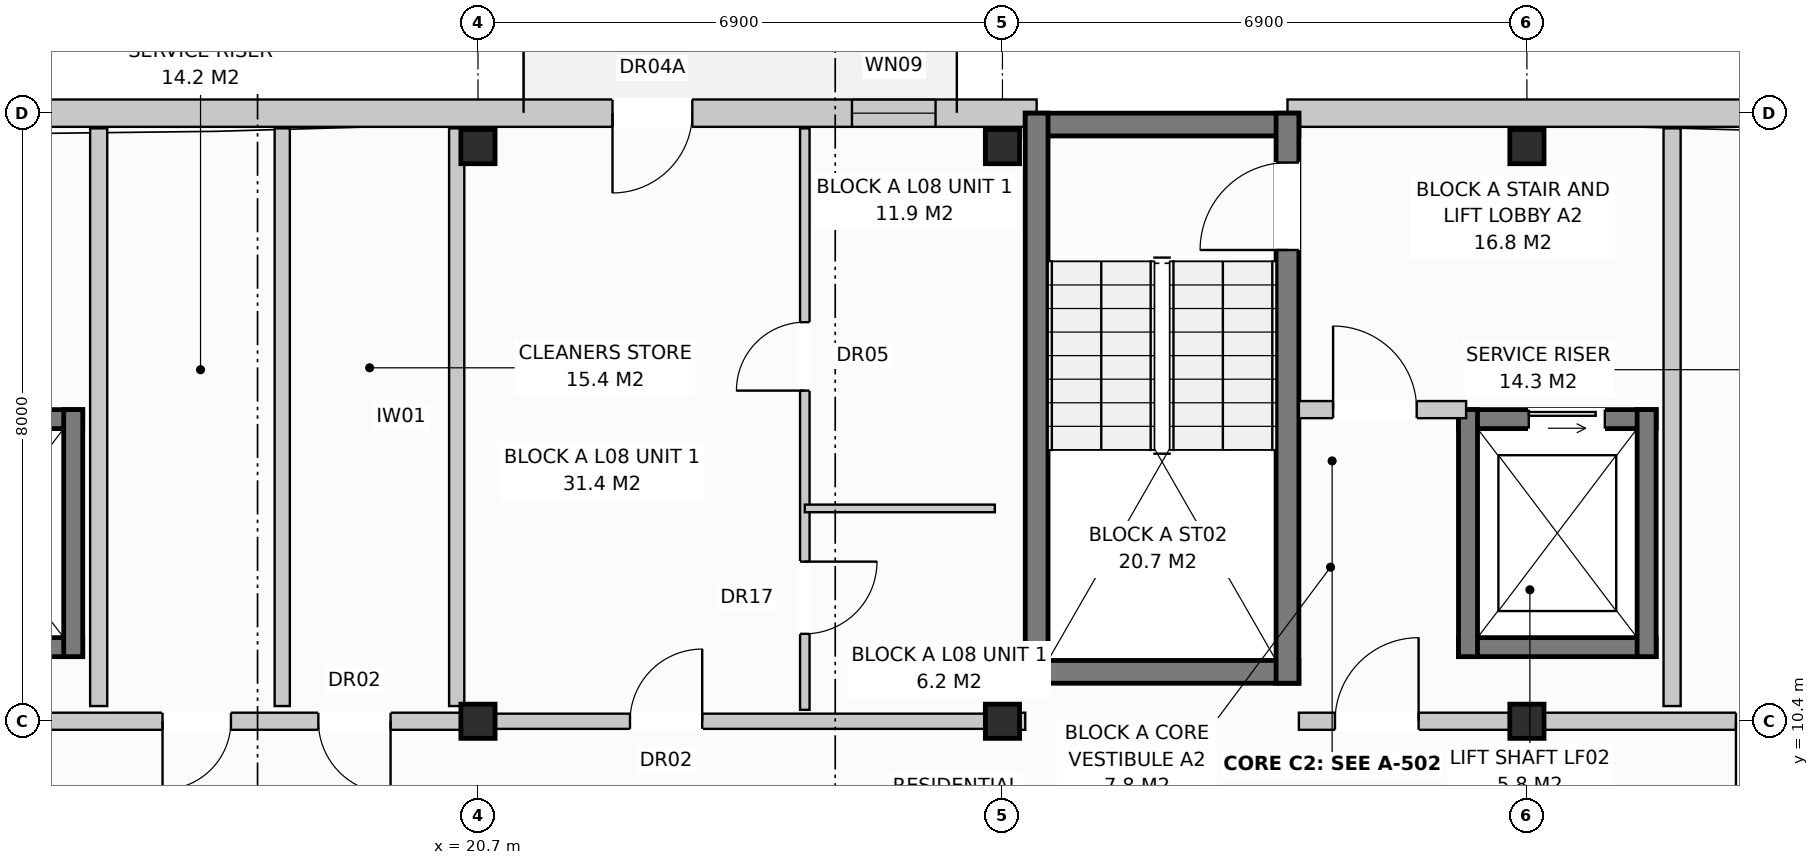
"""IFC4 building model, lengths in metres.
Left out: names, types, materials, properties, quantities, classifications, styles, units other than length and angle.
Written with IfcOpenShell. Run it as: python <this file> out.ifc"""

import sys

from ifc_helpers import new_model, si_unit, direction, frame, frame_2d, origin, origin_with_axes, origin_2d, place, context, subcontext, project, spatial, rectangle, extrude, element, fill, save


model = new_model("IFC4")
c1 = context("Model", 3, precision=1e-05, world=origin(), true_north=direction((0.0, 1.0)))
c2 = subcontext(c1, "Body", "Model", "MODEL_VIEW")
j1 = project(units=[si_unit("LENGTHUNIT", "METRE"), si_unit("PLANEANGLEUNIT", "RADIAN")], contexts=[c1])
p1 = place(None, origin())
s1 = spatial("IfcSite", under=j1, at=p1, CompositionType="ELEMENT")
p2 = place(p1, origin())
s2 = spatial("IfcBuilding", under=s1, at=p2, CompositionType="ELEMENT")
p3 = place(p2, frame((0.0, 0.0, 27.2)))
s3 = spatial("IfcBuildingStorey", under=s2, at=p3, CompositionType="ELEMENT", Elevation=27.2)
for number, where, z_axis, x_axis in (
    (1, (20.7, 10.4, 0.0), (0.0, 0.0, 1.0), (1.0, 0.0, 0.0)),
    (2, (20.7, 17.96, 0.0), (0.0, 0.0, 1.0), (1.0, 0.0, 0.0)),
    (3, (27.6, 10.4, 0.0), (0.0, 0.0, 1.0), (1.0, 0.0, 0.0)),
    (4, (27.6, 17.96, 0.0), (0.0, 0.0, 1.0), (1.0, 0.0, 0.0)),
    (5, (34.5, 10.4, 0.0), (0.0, 0.0, 1.0), (1.0, 0.0, 0.0)),
    (6, (34.5, 17.96, 0.0), (0.0, 0.0, 1.0), (1.0, 0.0, 0.0)),
):
    element("IfcColumn", number, at=place(p3, frame(where, z_axis=z_axis, x_axis=x_axis)), inside=s3, PredefinedType="COLUMN", context=c2, shape_type="SweptSolid", body=[
        extrude(rectangle(XDim=0.45, YDim=0.45, at=origin_2d()), origin(), (0.0, 0.0, 1.0), 3.2),
    ])
p4 = place(p3, frame((10.65, 18.4, 0.0), z_axis=(0.0, 0.0, 1.0), x_axis=(1.0, 0.0, 0.0)))
e7 = element("IfcWall", 7, at=p4, inside=s3, PredefinedType="STANDARD", context=c2, shape_type="SweptSolid", body=[
    extrude(rectangle(XDim=17.4, YDim=0.36, at=frame_2d((8.7, 0.0))), origin(), (0.0, 0.0, 1.0), 2.96),
])
p5 = place(p4, frame((11.82, 0.0, 0.0)))
e8 = element("IfcOpeningElement", 8, at=p5, cuts=e7, PredefinedType="OPENING", context=c2, shape_type="SweptSolid", body=[
    extrude(rectangle(XDim=1.05, YDim=2.12, at=frame_2d((0.525, 1.06))), frame((0.0, 0.192, 0.0), z_axis=(0.0, -1.0, 0.0), x_axis=(1.0, 0.0, 0.0)), (0.0, 0.0, 1.0), 0.384),
])
p6 = place(p4, frame((14.97, 0.0, 0.72)))
e9 = element("IfcOpeningElement", 9, at=p6, cuts=e7, PredefinedType="OPENING", context=c2, shape_type="SweptSolid", body=[
    extrude(rectangle(XDim=1.1, YDim=1.5, at=frame_2d((0.55, 0.75))), frame((0.0, 0.192, 0.0), z_axis=(0.0, -1.0, 0.0), x_axis=(1.0, 0.0, 0.0)), (0.0, 0.0, 1.0), 0.384),
])
p7 = place(p3, frame((31.35, 18.4, 0.0), z_axis=(0.0, 0.0, 1.0), x_axis=(1.0, 0.0, 0.0)))
e10 = element("IfcWall", 10, at=p7, inside=s3, PredefinedType="STANDARD", context=c2, shape_type="SweptSolid", body=[
    extrude(rectangle(XDim=23.68, YDim=0.36, at=frame_2d((11.84, 0.0))), origin(), (0.0, 0.0, 1.0), 2.96),
])
p8 = place(p7, frame((15.269, 0.0, 0.0)))
e11 = element("IfcOpeningElement", 11, at=p8, cuts=e10, PredefinedType="OPENING", context=c2, shape_type="SweptSolid", body=[
    extrude(rectangle(XDim=1.05, YDim=2.12, at=frame_2d((0.525, 1.06))), frame((0.0, 0.192, 0.0), z_axis=(0.0, -1.0, 0.0), x_axis=(1.0, 0.0, 0.0)), (0.0, 0.0, 1.0), 0.384),
])
p9 = place(p7, frame((11.27, 0.0, 0.8)))
e12 = element("IfcOpeningElement", 12, at=p9, cuts=e10, PredefinedType="OPENING", context=c2, shape_type="SweptSolid", body=[
    extrude(rectangle(XDim=1.9, YDim=1.85, at=frame_2d((0.95, 0.925))), frame((0.0, 0.192, 0.0), z_axis=(0.0, -1.0, 0.0), x_axis=(1.0, 0.0, 0.0)), (0.0, 0.0, 1.0), 0.384),
])
p10 = place(p7, frame((20.32, 0.0, 0.8)))
e13 = element("IfcOpeningElement", 13, at=p10, cuts=e10, PredefinedType="OPENING", context=c2, shape_type="SweptSolid", body=[
    extrude(rectangle(XDim=1.8, YDim=1.7, at=frame_2d((0.9, 0.85))), frame((0.0, 0.192, 0.0), z_axis=(0.0, -1.0, 0.0), x_axis=(1.0, 0.0, 0.0)), (0.0, 0.0, 1.0), 0.384),
])
p11 = place(p3, frame((12.9, 14.375, 0.0), z_axis=(0.0, 0.0, 1.0), x_axis=(1.0, 0.0, 0.0)))
e14 = element("IfcWall", 14, at=p11, inside=s3, PredefinedType="SHEAR", context=c2, shape_type="SweptSolid", body=[
    extrude(rectangle(XDim=2.6, YDim=0.25, at=frame_2d((1.3, 0.0))), origin(), (0.0, 0.0, 1.0), 2.96),
])
p12 = place(p11, frame((0.875, 0.0, 0.0)))
e15 = element("IfcOpeningElement", 15, at=p12, cuts=e14, PredefinedType="OPENING", context=c2, shape_type="SweptSolid", body=[
    extrude(rectangle(XDim=1.1, YDim=2.1, at=frame_2d((0.55, 1.05))), frame((0.0, 0.137, 0.0), z_axis=(0.0, -1.0, 0.0), x_axis=(1.0, 0.0, 0.0)), (0.0, 0.0, 1.0), 0.274),
])
p13 = place(p3, frame((12.9, 11.375, 0.0), z_axis=(0.0, 0.0, 1.0), x_axis=(1.0, 0.0, 0.0)))
e16 = element("IfcWall", 16, at=p13, inside=s3, PredefinedType="SHEAR", context=c2, shape_type="SweptSolid", body=[
    extrude(rectangle(XDim=2.6, YDim=0.25, at=frame_2d((1.3, 0.0))), origin(), (0.0, 0.0, 1.0), 2.96),
])
p14 = place(p3, frame((15.375, 11.25, 0.0), z_axis=(0.0, 0.0, 1.0), x_axis=(0.0, 1.0, 0.0)))
e17 = element("IfcWall", 17, at=p14, inside=s3, PredefinedType="SHEAR", context=c2, shape_type="SweptSolid", body=[
    extrude(rectangle(XDim=3.25, YDim=0.25, at=frame_2d((1.625, 0.0))), origin(), (0.0, 0.0, 1.0), 2.96),
])
p15 = place(p3, frame((15.71, 10.6, 0.0), z_axis=(0.0, 0.0, 1.0), x_axis=(0.0, 1.0, 0.0)))
e18 = element("IfcWall", 18, at=p15, inside=s3, PredefinedType="PARTITIONING", context=c2, shape_type="SweptSolid", body=[
    extrude(rectangle(XDim=7.6, YDim=0.225, at=frame_2d((3.8, 0.0))), origin(), (0.0, 0.0, 1.0), 2.59),
])
for number, where, z_axis, x_axis in (
    (19, (18.125, 10.6, 0.0), (0.0, 0.0, 1.0), (0.0, 1.0, 0.0)),
    (20, (20.42, 10.6, 0.0), (0.0, 0.0, 1.0), (0.0, 1.0, 0.0)),
):
    element("IfcWall", number, at=place(p3, frame(where, z_axis=z_axis, x_axis=x_axis)), inside=s3, PredefinedType="PARTITIONING", context=c2, shape_type="SweptSolid", body=[
        extrude(rectangle(XDim=7.6, YDim=0.2, at=frame_2d((3.8, 0.0))), origin(), (0.0, 0.0, 1.0), 2.96),
    ])
p16 = place(p3, frame((10.8, 10.4, 0.0), z_axis=(0.0, 0.0, 1.0), x_axis=(1.0, 0.0, 0.0)))
e21 = element("IfcWall", 21, at=p16, inside=s3, PredefinedType="PARTITIONING", context=c2, shape_type="SweptSolid", body=[
    extrude(rectangle(XDim=9.9, YDim=0.225, at=frame_2d((4.95, 0.0))), origin(), (0.0, 0.0, 1.0), 2.4),
])
p17 = place(p16, frame((0.475, 0.0, 0.0)))
e22 = element("IfcOpeningElement", 22, at=p17, cuts=e21, PredefinedType="OPENING", context=c2, shape_type="SweptSolid", body=[
    extrude(rectangle(XDim=1.1, YDim=2.15, at=frame_2d((0.55, 1.075))), frame((0.0, 0.125, 0.0), z_axis=(0.0, -1.0, 0.0), x_axis=(1.0, 0.0, 0.0)), (0.0, 0.0, 1.0), 0.249),
])
p18 = place(p16, frame((5.75, 0.0, 0.0)))
e23 = element("IfcOpeningElement", 23, at=p18, cuts=e21, PredefinedType="OPENING", context=c2, shape_type="SweptSolid", body=[
    extrude(rectangle(XDim=0.9, YDim=2.1, at=frame_2d((0.45, 1.05))), frame((0.0, 0.125, 0.0), z_axis=(0.0, -1.0, 0.0), x_axis=(1.0, 0.0, 0.0)), (0.0, 0.0, 1.0), 0.249),
])
p19 = place(p16, frame((7.8, 0.0, 0.0)))
e24 = element("IfcOpeningElement", 24, at=p19, cuts=e21, PredefinedType="OPENING", context=c2, shape_type="SweptSolid", body=[
    extrude(rectangle(XDim=0.95, YDim=2.15, at=frame_2d((0.475, 1.075))), frame((0.0, 0.125, 0.0), z_axis=(0.0, -1.0, 0.0), x_axis=(1.0, 0.0, 0.0)), (0.0, 0.0, 1.0), 0.249),
])
for number, where, z_axis, x_axis in (
    (25, (27.9, 18.25, 0.0), (0.0, 0.0, 1.0), (1.0, 0.0, 0.0)),
    (26, (27.9, 11.05, 0.0), (0.0, 0.0, 1.0), (1.0, 0.0, 0.0)),
):
    element("IfcWall", number, at=place(p3, frame(where, z_axis=z_axis, x_axis=x_axis)), inside=s3, PredefinedType="SHEAR", context=c2, shape_type="SweptSolid", body=[
        extrude(rectangle(XDim=3.6, YDim=0.3, at=frame_2d((1.8, 0.0))), origin(), (0.0, 0.0, 1.0), 2.96),
    ])
p20 = place(p3, frame((28.05, 10.9, 0.0), z_axis=(0.0, 0.0, 1.0), x_axis=(0.0, 1.0, 0.0)))
e27 = element("IfcWall", 27, at=p20, inside=s3, PredefinedType="SHEAR", context=c2, shape_type="SweptSolid", body=[
    extrude(rectangle(XDim=7.5, YDim=0.3, at=frame_2d((3.75, 0.0))), origin(), (0.0, 0.0, 1.0), 2.96),
])
p21 = place(p3, frame((31.35, 10.9, 0.0), z_axis=(0.0, 0.0, 1.0), x_axis=(0.0, 1.0, 0.0)))
e28 = element("IfcWall", 28, at=p21, inside=s3, PredefinedType="SHEAR", context=c2, shape_type="SweptSolid", body=[
    extrude(rectangle(XDim=7.5, YDim=0.3, at=frame_2d((3.75, 0.0))), origin(), (0.0, 0.0, 1.0), 2.96),
])
p22 = place(p21, frame((5.7, 0.0, 0.0)))
e29 = element("IfcOpeningElement", 29, at=p22, cuts=e28, PredefinedType="OPENING", context=c2, shape_type="SweptSolid", body=[
    extrude(rectangle(XDim=1.15, YDim=2.15, at=frame_2d((0.575, 1.075))), frame((0.0, 0.162, 0.0), z_axis=(0.0, -1.0, 0.0), x_axis=(1.0, 0.0, 0.0)), (0.0, 0.0, 1.0), 0.324),
])
p23 = place(p3, frame((33.6, 14.375, 0.0), z_axis=(0.0, 0.0, 1.0), x_axis=(1.0, 0.0, 0.0)))
e30 = element("IfcWall", 30, at=p23, inside=s3, PredefinedType="SHEAR", context=c2, shape_type="SweptSolid", body=[
    extrude(rectangle(XDim=2.6, YDim=0.25, at=frame_2d((1.3, 0.0))), origin(), (0.0, 0.0, 1.0), 2.96),
])
p24 = place(p23, frame((0.925, 0.0, 0.0)))
e31 = element("IfcOpeningElement", 31, at=p24, cuts=e30, PredefinedType="OPENING", context=c2, shape_type="SweptSolid", body=[
    extrude(rectangle(XDim=1.0, YDim=2.1, at=frame_2d((0.5, 1.05))), frame((0.0, 0.137, 0.0), z_axis=(0.0, -1.0, 0.0), x_axis=(1.0, 0.0, 0.0)), (0.0, 0.0, 1.0), 0.274),
])
p25 = place(p3, frame((33.6, 11.375, 0.0), z_axis=(0.0, 0.0, 1.0), x_axis=(1.0, 0.0, 0.0)))
e32 = element("IfcWall", 32, at=p25, inside=s3, PredefinedType="SHEAR", context=c2, shape_type="SweptSolid", body=[
    extrude(rectangle(XDim=2.6, YDim=0.25, at=frame_2d((1.3, 0.0))), origin(), (0.0, 0.0, 1.0), 2.96),
])
for number, where, z_axis, x_axis in (
    (33, (33.725, 11.25, 0.0), (0.0, 0.0, 1.0), (0.0, 1.0, 0.0)),
    (34, (36.075, 11.25, 0.0), (0.0, 0.0, 1.0), (0.0, 1.0, 0.0)),
):
    element("IfcWall", number, at=place(p3, frame(where, z_axis=z_axis, x_axis=x_axis)), inside=s3, PredefinedType="SHEAR", context=c2, shape_type="SweptSolid", body=[
        extrude(rectangle(XDim=3.25, YDim=0.25, at=frame_2d((1.625, 0.0))), origin(), (0.0, 0.0, 1.0), 2.96),
    ])
p26 = place(p3, frame((36.41, 10.6, 0.0), z_axis=(0.0, 0.0, 1.0), x_axis=(0.0, 1.0, 0.0)))
e35 = element("IfcWall", 35, at=p26, inside=s3, PredefinedType="PARTITIONING", context=c2, shape_type="SweptSolid", body=[
    extrude(rectangle(XDim=7.6, YDim=0.225, at=frame_2d((3.8, 0.0))), origin(), (0.0, 0.0, 1.0), 2.59),
])
p27 = place(p3, frame((31.5, 14.5, 0.0), z_axis=(0.0, 0.0, 1.0), x_axis=(1.0, 0.0, 0.0)))
e36 = element("IfcWall", 36, at=p27, inside=s3, PredefinedType="PARTITIONING", context=c2, shape_type="SweptSolid", body=[
    extrude(rectangle(XDim=2.2, YDim=0.225, at=frame_2d((1.1, 0.0))), origin(), (0.0, 0.0, 1.0), 2.96),
])
p28 = place(p27, frame((0.45, 0.0, 0.0)))
e37 = element("IfcOpeningElement", 37, at=p28, cuts=e36, PredefinedType="OPENING", context=c2, shape_type="SweptSolid", body=[
    extrude(rectangle(XDim=1.1, YDim=2.15, at=frame_2d((0.55, 1.075))), frame((0.0, 0.125, 0.0), z_axis=(0.0, -1.0, 0.0), x_axis=(1.0, 0.0, 0.0)), (0.0, 0.0, 1.0), 0.249),
])
p29 = place(p3, frame((27.6, 10.4, 0.0), z_axis=(0.0, 0.0, 1.0), x_axis=(1.0, 0.0, 0.0)))
e38 = element("IfcWall", 38, at=p29, inside=s3, PredefinedType="PARTITIONING", context=c2, shape_type="SweptSolid", body=[
    extrude(rectangle(XDim=0.3, YDim=0.225, at=frame_2d((0.15, 0.0))), origin(), (0.0, 0.0, 1.0), 2.96),
])
p30 = place(p3, frame((31.5, 10.4, 0.0), z_axis=(0.0, 0.0, 1.0), x_axis=(1.0, 0.0, 0.0)))
e39 = element("IfcWall", 39, at=p30, inside=s3, PredefinedType="PARTITIONING", context=c2, shape_type="SweptSolid", body=[
    extrude(rectangle(XDim=9.9, YDim=0.225, at=frame_2d((4.95, 0.0))), origin(), (0.0, 0.0, 1.0), 2.4),
])
p31 = place(p30, frame((0.475, 0.0, 0.0)))
e40 = element("IfcOpeningElement", 40, at=p31, cuts=e39, PredefinedType="OPENING", context=c2, shape_type="SweptSolid", body=[
    extrude(rectangle(XDim=1.1, YDim=2.15, at=frame_2d((0.55, 1.075))), frame((0.0, 0.125, 0.0), z_axis=(0.0, -1.0, 0.0), x_axis=(1.0, 0.0, 0.0)), (0.0, 0.0, 1.0), 0.249),
])
p32 = place(p30, frame((5.75, 0.0, 0.0)))
e41 = element("IfcOpeningElement", 41, at=p32, cuts=e39, PredefinedType="OPENING", context=c2, shape_type="SweptSolid", body=[
    extrude(rectangle(XDim=0.9, YDim=2.1, at=frame_2d((0.45, 1.05))), frame((0.0, 0.125, 0.0), z_axis=(0.0, -1.0, 0.0), x_axis=(1.0, 0.0, 0.0)), (0.0, 0.0, 1.0), 0.249),
])
p33 = place(p30, frame((7.8, 0.0, 0.0)))
e42 = element("IfcOpeningElement", 42, at=p33, cuts=e39, PredefinedType="OPENING", context=c2, shape_type="SweptSolid", body=[
    extrude(rectangle(XDim=0.95, YDim=2.15, at=frame_2d((0.475, 1.075))), frame((0.0, 0.125, 0.0), z_axis=(0.0, -1.0, 0.0), x_axis=(1.0, 0.0, 0.0)), (0.0, 0.0, 1.0), 0.249),
])
p34 = place(p3, frame((20.7, 10.4, 0.0), z_axis=(0.0, 0.0, 1.0), x_axis=(1.0, 0.0, 0.0)))
e43 = element("IfcWall", 43, at=p34, inside=s3, PredefinedType="PARTITIONING", context=c2, shape_type="SweptSolid", body=[
    extrude(rectangle(XDim=6.9, YDim=0.2, at=frame_2d((3.45, 0.0))), origin(), (0.0, 0.0, 1.0), 2.4),
])
p35 = place(p34, frame((2.0, 0.0, 0.0)))
e44 = element("IfcOpeningElement", 44, at=p35, cuts=e43, PredefinedType="OPENING", context=c2, shape_type="SweptSolid", body=[
    extrude(rectangle(XDim=0.95, YDim=2.15, at=frame_2d((0.475, 1.075))), frame((0.0, 0.112, 0.0), z_axis=(0.0, -1.0, 0.0), x_axis=(1.0, 0.0, 0.0)), (0.0, 0.0, 1.0), 0.224),
])
p36 = place(p3, frame((25.0, 10.55, 0.0), z_axis=(0.0, 0.0, 1.0), x_axis=(0.0, 1.0, 0.0)))
e45 = element("IfcWall", 45, at=p36, inside=s3, PredefinedType="PARTITIONING", context=c2, shape_type="SweptSolid", body=[
    extrude(rectangle(XDim=7.65, YDim=0.125, at=frame_2d((3.825, 0.0))), origin(), (0.0, 0.0, 1.0), 2.96),
])
p37 = place(p36, frame((1.0, 0.0, 0.0)))
e46 = element("IfcOpeningElement", 46, at=p37, cuts=e45, PredefinedType="OPENING", context=c2, shape_type="SweptSolid", body=[
    extrude(rectangle(XDim=0.95, YDim=2.1, at=frame_2d((0.475, 1.05))), frame((0.0, 0.074, 0.0), z_axis=(0.0, -1.0, 0.0), x_axis=(1.0, 0.0, 0.0)), (0.0, 0.0, 1.0), 0.149),
])
p38 = place(p36, frame((4.2, 0.0, 0.0)))
e47 = element("IfcOpeningElement", 47, at=p38, cuts=e45, PredefinedType="OPENING", context=c2, shape_type="SweptSolid", body=[
    extrude(rectangle(XDim=0.9, YDim=2.1, at=frame_2d((0.45, 1.05))), frame((0.0, 0.074, 0.0), z_axis=(0.0, -1.0, 0.0), x_axis=(1.0, 0.0, 0.0)), (0.0, 0.0, 1.0), 0.149),
])
p39 = place(p3, frame((25.0, 13.2, 0.0), z_axis=(0.0, 0.0, 1.0), x_axis=(1.0, 0.0, 0.0)))
e48 = element("IfcWall", 48, at=p39, inside=s3, PredefinedType="PARTITIONING", context=c2, shape_type="SweptSolid", body=[
    extrude(rectangle(XDim=2.5, YDim=0.1, at=frame_2d((1.25, 0.0))), origin(), (0.0, 0.0, 1.0), 2.96),
])
p40 = place(p5, frame((1.05, 0.0, 0.0), z_axis=(0.0, 0.0, 1.0), x_axis=(-1.0, 0.0, 0.0)))
e49 = element("IfcDoor", 49, at=p40, inside=s3, OperationType="SINGLE_SWING_LEFT", PredefinedType="DOOR", context=c2, shape_type="SweptSolid", body=[
    extrude(rectangle(XDim=1.05, YDim=2.12, at=frame_2d((0.525, 1.06))), frame((0.0, 0.025, 0.0), z_axis=(0.0, -1.0, 0.0), x_axis=(1.0, 0.0, 0.0)), (0.0, 0.0, 1.0), 0.05),
])
fill(e8, e49)
p41 = place(p6, origin_with_axes())
e50 = element("IfcWindow", 50, at=p41, inside=s3, PartitioningType="SINGLE_PANEL", PredefinedType="WINDOW", context=c2, shape_type="SweptSolid", body=[
    extrude(rectangle(XDim=1.1, YDim=1.5, at=frame_2d((0.55, 0.75))), frame((0.0, 0.03, 0.0), z_axis=(0.0, -1.0, 0.0), x_axis=(1.0, 0.0, 0.0)), (0.0, 0.0, 1.0), 0.06),
])
fill(e9, e50)
p42 = place(p18, frame((0.9, 0.0, 0.0), z_axis=(0.0, 0.0, 1.0), x_axis=(-1.0, 0.0, 0.0)))
e51 = element("IfcDoor", 51, at=p42, inside=s3, OperationType="SINGLE_SWING_LEFT", PredefinedType="DOOR", context=c2, shape_type="SweptSolid", body=[
    extrude(rectangle(XDim=0.9, YDim=2.1, at=frame_2d((0.45, 1.05))), frame((0.0, 0.025, 0.0), z_axis=(0.0, -1.0, 0.0), x_axis=(1.0, 0.0, 0.0)), (0.0, 0.0, 1.0), 0.05),
])
fill(e23, e51)
p43 = place(p19, frame((0.95, 0.0, 0.0), z_axis=(0.0, 0.0, 1.0), x_axis=(-1.0, 0.0, 0.0)))
e52 = element("IfcDoor", 52, at=p43, inside=s3, OperationType="SINGLE_SWING_RIGHT", PredefinedType="DOOR", context=c2, shape_type="SweptSolid", body=[
    extrude(rectangle(XDim=0.95, YDim=2.15, at=frame_2d((0.475, 1.075))), frame((0.0, 0.025, 0.0), z_axis=(0.0, -1.0, 0.0), x_axis=(1.0, 0.0, 0.0)), (0.0, 0.0, 1.0), 0.05),
])
fill(e24, e52)
p44 = place(p22, origin_with_axes())
e53 = element("IfcDoor", 53, at=p44, inside=s3, OperationType="SINGLE_SWING_LEFT", PredefinedType="DOOR", context=c2, shape_type="SweptSolid", body=[
    extrude(rectangle(XDim=1.15, YDim=2.15, at=frame_2d((0.575, 1.075))), frame((0.0, 0.025, 0.0), z_axis=(0.0, -1.0, 0.0), x_axis=(1.0, 0.0, 0.0)), (0.0, 0.0, 1.0), 0.05),
])
fill(e29, e53)
p45 = place(p24, origin_with_axes())
e54 = element("IfcDoor", 54, at=p45, inside=s3, OperationType="SLIDING_TO_LEFT", PredefinedType="DOOR", context=c2, shape_type="SweptSolid", body=[
    extrude(rectangle(XDim=1.0, YDim=2.1, at=frame_2d((0.5, 1.05))), frame((0.0, 0.025, 0.0), z_axis=(0.0, -1.0, 0.0), x_axis=(1.0, 0.0, 0.0)), (0.0, 0.0, 1.0), 0.05),
])
fill(e31, e54)
p46 = place(p28, origin_with_axes())
e55 = element("IfcDoor", 55, at=p46, inside=s3, OperationType="SINGLE_SWING_LEFT", PredefinedType="DOOR", context=c2, shape_type="SweptSolid", body=[
    extrude(rectangle(XDim=1.1, YDim=2.15, at=frame_2d((0.55, 1.075))), frame((0.0, 0.025, 0.0), z_axis=(0.0, -1.0, 0.0), x_axis=(1.0, 0.0, 0.0)), (0.0, 0.0, 1.0), 0.05),
])
fill(e37, e55)
p47 = place(p31, origin_with_axes())
e56 = element("IfcDoor", 56, at=p47, inside=s3, OperationType="SINGLE_SWING_RIGHT", PredefinedType="DOOR", context=c2, shape_type="SweptSolid", body=[
    extrude(rectangle(XDim=1.1, YDim=2.15, at=frame_2d((0.55, 1.075))), frame((0.0, 0.025, 0.0), z_axis=(0.0, -1.0, 0.0), x_axis=(1.0, 0.0, 0.0)), (0.0, 0.0, 1.0), 0.05),
])
fill(e40, e56)
p48 = place(p32, frame((0.9, 0.0, 0.0), z_axis=(0.0, 0.0, 1.0), x_axis=(-1.0, 0.0, 0.0)))
e57 = element("IfcDoor", 57, at=p48, inside=s3, OperationType="SINGLE_SWING_LEFT", PredefinedType="DOOR", context=c2, shape_type="SweptSolid", body=[
    extrude(rectangle(XDim=0.9, YDim=2.1, at=frame_2d((0.45, 1.05))), frame((0.0, 0.025, 0.0), z_axis=(0.0, -1.0, 0.0), x_axis=(1.0, 0.0, 0.0)), (0.0, 0.0, 1.0), 0.05),
])
fill(e41, e57)
p49 = place(p35, origin_with_axes())
e58 = element("IfcDoor", 58, at=p49, inside=s3, OperationType="SINGLE_SWING_RIGHT", PredefinedType="DOOR", context=c2, shape_type="SweptSolid", body=[
    extrude(rectangle(XDim=0.95, YDim=2.15, at=frame_2d((0.475, 1.075))), frame((0.0, 0.025, 0.0), z_axis=(0.0, -1.0, 0.0), x_axis=(1.0, 0.0, 0.0)), (0.0, 0.0, 1.0), 0.05),
])
fill(e44, e58)
p50 = place(p37, frame((0.95, 0.0, 0.0), z_axis=(0.0, 0.0, 1.0), x_axis=(-1.0, 0.0, 0.0)))
e59 = element("IfcDoor", 59, at=p50, inside=s3, OperationType="SINGLE_SWING_RIGHT", PredefinedType="DOOR", context=c2, shape_type="SweptSolid", body=[
    extrude(rectangle(XDim=0.95, YDim=2.1, at=frame_2d((0.475, 1.05))), frame((0.0, 0.025, 0.0), z_axis=(0.0, -1.0, 0.0), x_axis=(1.0, 0.0, 0.0)), (0.0, 0.0, 1.0), 0.05),
])
fill(e46, e59)
p51 = place(p38, origin_with_axes())
e60 = element("IfcDoor", 60, at=p51, inside=s3, OperationType="SINGLE_SWING_LEFT", PredefinedType="DOOR", context=c2, shape_type="SweptSolid", body=[
    extrude(rectangle(XDim=0.9, YDim=2.1, at=frame_2d((0.45, 1.05))), frame((0.0, 0.025, 0.0), z_axis=(0.0, -1.0, 0.0), x_axis=(1.0, 0.0, 0.0)), (0.0, 0.0, 1.0), 0.05),
])
fill(e47, e60)
save(model, sys.argv[1])
